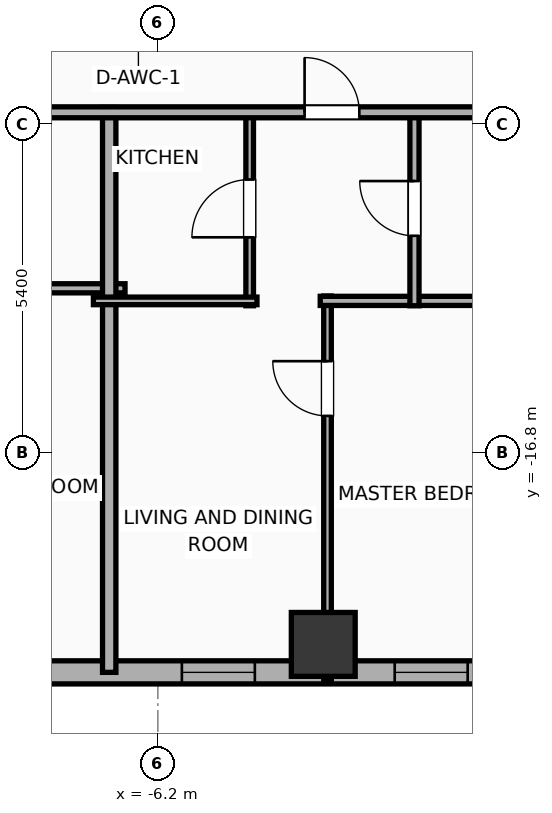
"""IFC4 building model, lengths in metres.
Left out: names, types, materials, properties, quantities, classifications, styles, units other than length and angle.
Written with IfcOpenShell. Run it as: python <this file> out.ifc"""

import sys

from ifc_helpers import new_model, si_unit, direction, frame, frame_2d, origin, origin_2d, place, context, subcontext, project, spatial, rectangle, hollow_rectangle, extrude, element, fill, save


model = new_model("IFC4")
c1 = context("Model", 3, precision=1e-05, world=origin(), true_north=direction((0.0, 1.0)))
c2 = subcontext(c1, "Body", "Model", "MODEL_VIEW")
j1 = project(units=[si_unit("LENGTHUNIT", "METRE"), si_unit("PLANEANGLEUNIT", "RADIAN")], contexts=[c1])
p1 = place(None, origin())
s1 = spatial("IfcSite", under=j1, at=p1, CompositionType="ELEMENT")
p2 = place(p1, origin())
s2 = spatial("IfcBuilding", under=s1, at=p2, CompositionType="ELEMENT")
p3 = place(p2, frame((0.0, 0.0, 120.9)))
s3 = spatial("IfcBuildingStorey", under=s2, at=p3, CompositionType="ELEMENT", Elevation=120.9)
p4 = place(p3, frame((-3.48, -19.95, 0.0), z_axis=(0.0, 0.0, 1.0), x_axis=(1.0, 0.0, 0.0)))
e1 = element("IfcColumn", 1, at=p4, inside=s3, PredefinedType="COLUMN", context=c2, shape_type="SweptSolid", body=[
    extrude(hollow_rectangle(XDim=1.05, YDim=1.05, WallThickness=0.036, at=origin_2d()), origin(), (0.0, 0.0, 1.0), 3.9),
])
p5 = place(p3, frame((29.381, -20.41, 0.0), z_axis=(0.0, 0.0, 1.0), x_axis=(-1.0, 0.0, 0.0)))
e2 = element("IfcWall", 2, at=p5, inside=s3, PredefinedType="ELEMENTEDWALL", context=c2, shape_type="SweptSolid", body=[
    extrude(rectangle(XDim=54.763, YDim=0.38, at=frame_2d((27.381, 0.0))), origin(), (0.0, 0.0, 1.0), 3.65),
])
p6 = place(p5, frame((5.645, 0.0, 0.75)))
e3 = element("IfcOpeningElement", 3, at=p6, cuts=e2, PredefinedType="OPENING", context=c2, shape_type="SweptSolid", body=[
    extrude(rectangle(XDim=2.4, YDim=2.1, at=frame_2d((1.2, 1.05))), frame((0.0, 0.2, 0.0), z_axis=(0.0, -1.0, 0.0), x_axis=(1.0, 0.0, 0.0)), (0.0, 0.0, 1.0), 0.4),
])
p7 = place(p5, frame((47.567, 0.0, 0.75)))
e4 = element("IfcOpeningElement", 4, at=p7, cuts=e2, PredefinedType="OPENING", context=c2, shape_type="SweptSolid", body=[
    extrude(rectangle(XDim=2.4, YDim=2.1, at=frame_2d((1.2, 1.05))), frame((0.0, 0.2, 0.0), z_axis=(0.0, -1.0, 0.0), x_axis=(1.0, 0.0, 0.0)), (0.0, 0.0, 1.0), 0.4),
])
p8 = place(p5, frame((51.831, 0.0, 0.75)))
e5 = element("IfcOpeningElement", 5, at=p8, cuts=e2, PredefinedType="OPENING", context=c2, shape_type="SweptSolid", body=[
    extrude(rectangle(XDim=1.2, YDim=2.05, at=frame_2d((0.6, 1.025))), frame((0.0, 0.2, 0.0), z_axis=(0.0, -1.0, 0.0), x_axis=(1.0, 0.0, 0.0)), (0.0, 0.0, 1.0), 0.4),
])
p9 = place(p5, frame((44.606, 0.0, 0.75)))
e6 = element("IfcOpeningElement", 6, at=p9, cuts=e2, PredefinedType="OPENING", context=c2, shape_type="SweptSolid", body=[
    extrude(rectangle(XDim=1.2, YDim=2.05, at=frame_2d((0.6, 1.025))), frame((0.0, 0.2, 0.0), z_axis=(0.0, -1.0, 0.0), x_axis=(1.0, 0.0, 0.0)), (0.0, 0.0, 1.0), 0.4),
])
p10 = place(p5, frame((40.986, 0.0, 0.75)))
e7 = element("IfcOpeningElement", 7, at=p10, cuts=e2, PredefinedType="OPENING", context=c2, shape_type="SweptSolid", body=[
    extrude(rectangle(XDim=1.2, YDim=2.05, at=frame_2d((0.6, 1.025))), frame((0.0, 0.2, 0.0), z_axis=(0.0, -1.0, 0.0), x_axis=(1.0, 0.0, 0.0)), (0.0, 0.0, 1.0), 0.4),
])
p11 = place(p5, frame((37.486, 0.0, 0.75)))
e8 = element("IfcOpeningElement", 8, at=p11, cuts=e2, PredefinedType="OPENING", context=c2, shape_type="SweptSolid", body=[
    extrude(rectangle(XDim=1.2, YDim=2.05, at=frame_2d((0.6, 1.025))), frame((0.0, 0.2, 0.0), z_axis=(0.0, -1.0, 0.0), x_axis=(1.0, 0.0, 0.0)), (0.0, 0.0, 1.0), 0.4),
])
p12 = place(p5, frame((33.986, 0.0, 0.75)))
e9 = element("IfcOpeningElement", 9, at=p12, cuts=e2, PredefinedType="OPENING", context=c2, shape_type="SweptSolid", body=[
    extrude(rectangle(XDim=1.2, YDim=2.05, at=frame_2d((0.6, 1.025))), frame((0.0, 0.2, 0.0), z_axis=(0.0, -1.0, 0.0), x_axis=(1.0, 0.0, 0.0)), (0.0, 0.0, 1.0), 0.4),
])
p13 = place(p5, frame((30.486, 0.0, 0.75)))
e10 = element("IfcOpeningElement", 10, at=p13, cuts=e2, PredefinedType="OPENING", context=c2, shape_type="SweptSolid", body=[
    extrude(rectangle(XDim=1.2, YDim=2.05, at=frame_2d((0.6, 1.025))), frame((0.0, 0.2, 0.0), z_axis=(0.0, -1.0, 0.0), x_axis=(1.0, 0.0, 0.0)), (0.0, 0.0, 1.0), 0.4),
])
p14 = place(p5, frame((26.986, 0.0, 0.75)))
e11 = element("IfcOpeningElement", 11, at=p14, cuts=e2, PredefinedType="OPENING", context=c2, shape_type="SweptSolid", body=[
    extrude(rectangle(XDim=1.2, YDim=2.05, at=frame_2d((0.6, 1.025))), frame((0.0, 0.2, 0.0), z_axis=(0.0, -1.0, 0.0), x_axis=(1.0, 0.0, 0.0)), (0.0, 0.0, 1.0), 0.4),
])
p15 = place(p5, frame((23.486, 0.0, 0.75)))
e12 = element("IfcOpeningElement", 12, at=p15, cuts=e2, PredefinedType="OPENING", context=c2, shape_type="SweptSolid", body=[
    extrude(rectangle(XDim=1.2, YDim=2.05, at=frame_2d((0.6, 1.025))), frame((0.0, 0.2, 0.0), z_axis=(0.0, -1.0, 0.0), x_axis=(1.0, 0.0, 0.0)), (0.0, 0.0, 1.0), 0.4),
])
p16 = place(p5, frame((19.986, 0.0, 0.75)))
e13 = element("IfcOpeningElement", 13, at=p16, cuts=e2, PredefinedType="OPENING", context=c2, shape_type="SweptSolid", body=[
    extrude(rectangle(XDim=1.2, YDim=2.05, at=frame_2d((0.6, 1.025))), frame((0.0, 0.2, 0.0), z_axis=(0.0, -1.0, 0.0), x_axis=(1.0, 0.0, 0.0)), (0.0, 0.0, 1.0), 0.4),
])
p17 = place(p5, frame((16.486, 0.0, 0.75)))
e14 = element("IfcOpeningElement", 14, at=p17, cuts=e2, PredefinedType="OPENING", context=c2, shape_type="SweptSolid", body=[
    extrude(rectangle(XDim=1.2, YDim=2.05, at=frame_2d((0.6, 1.025))), frame((0.0, 0.2, 0.0), z_axis=(0.0, -1.0, 0.0), x_axis=(1.0, 0.0, 0.0)), (0.0, 0.0, 1.0), 0.4),
])
p18 = place(p5, frame((11.698, 0.0, 0.75)))
e15 = element("IfcOpeningElement", 15, at=p18, cuts=e2, PredefinedType="OPENING", context=c2, shape_type="SweptSolid", body=[
    extrude(rectangle(XDim=1.2, YDim=2.05, at=frame_2d((0.6, 1.025))), frame((0.0, 0.2, 0.0), z_axis=(0.0, -1.0, 0.0), x_axis=(1.0, 0.0, 0.0)), (0.0, 0.0, 1.0), 0.4),
])
p19 = place(p5, frame((3.172, 0.0, 0.75)))
e16 = element("IfcOpeningElement", 16, at=p19, cuts=e2, PredefinedType="OPENING", context=c2, shape_type="SweptSolid", body=[
    extrude(rectangle(XDim=1.2, YDim=2.05, at=frame_2d((0.6, 1.025))), frame((0.0, 0.2, 0.0), z_axis=(0.0, -1.0, 0.0), x_axis=(1.0, 0.0, 0.0)), (0.0, 0.0, 1.0), 0.4),
])
p20 = place(p5, frame((1.13, 0.0, 0.75)))
e17 = element("IfcOpeningElement", 17, at=p20, cuts=e2, PredefinedType="OPENING", context=c2, shape_type="SweptSolid", body=[
    extrude(rectangle(XDim=1.2, YDim=2.05, at=frame_2d((0.6, 1.025))), frame((0.0, 0.2, 0.0), z_axis=(0.0, -1.0, 0.0), x_axis=(1.0, 0.0, 0.0)), (0.0, 0.0, 1.0), 0.4),
])
p21 = place(p3, frame((-10.53, -14.094, 0.0), z_axis=(0.0, 0.0, 1.0), x_axis=(1.0, 0.0, 0.0)))
e18 = element("IfcWall", 18, at=p21, inside=s3, PredefinedType="PLUMBINGWALL", context=c2, shape_type="SweptSolid", body=[
    extrude(rectangle(XDim=3.79, YDim=0.15, at=frame_2d((1.895, 0.0))), origin(), (0.0, 0.0, 1.0), 3.65),
])
p22 = place(p3, frame((-7.0, -20.41, 0.0), z_axis=(0.0, 0.0, 1.0), x_axis=(0.0, 1.0, 0.0)))
e19 = element("IfcWall", 19, at=p22, inside=s3, PredefinedType="PARTITIONING", context=c2, shape_type="SweptSolid", body=[
    extrude(rectangle(XDim=9.29, YDim=0.22, at=frame_2d((4.645, 0.0))), origin(), (0.0, 0.0, 1.0), 3.65),
])
p23 = place(p3, frame((-3.41, -20.56, 0.0), z_axis=(0.0, 0.0, 1.0), x_axis=(0.0, 1.0, 0.0)))
e20 = element("IfcWall", 20, at=p23, inside=s3, PredefinedType="PARTITIONING", context=c2, shape_type="SweptSolid", body=[
    extrude(rectangle(XDim=6.339, YDim=0.125, at=frame_2d((3.169, 0.0))), origin(), (0.0, 0.0, 1.0), 3.04),
])
p24 = place(p23, frame((4.368, 0.0, 0.0)))
e21 = element("IfcOpeningElement", 21, at=p24, cuts=e20, PredefinedType="OPENING", context=c2, shape_type="SweptSolid", body=[
    extrude(rectangle(XDim=0.9, YDim=2.05, at=frame_2d((0.45, 1.025))), frame((0.0, 0.073, 0.0), z_axis=(0.0, -1.0, 0.0), x_axis=(1.0, 0.0, 0.0)), (0.0, 0.0, 1.0), 0.145),
])
p25 = place(p3, frame((-3.53, -14.301, 0.0), z_axis=(0.0, 0.0, 1.0), x_axis=(1.0, 0.0, 0.0)))
e22 = element("IfcWall", 22, at=p25, inside=s3, PredefinedType="PLUMBINGWALL", context=c2, shape_type="SweptSolid", body=[
    extrude(rectangle(XDim=3.79, YDim=0.15, at=frame_2d((1.895, 0.0))), origin(), (0.0, 0.0, 1.0), 3.65),
])
p26 = place(p3, frame((-4.69, -14.381, 0.0), z_axis=(0.0, 0.0, 1.0), x_axis=(0.0, 1.0, 0.0)))
e23 = element("IfcWall", 23, at=p26, inside=s3, PredefinedType="PARTITIONING", context=c2, shape_type="SweptSolid", body=[
    extrude(rectangle(XDim=3.201, YDim=0.125, at=frame_2d((1.601, 0.0))), origin(), (0.0, 0.0, 1.0), 3.65),
])
p27 = place(p26, frame((1.125, 0.0, 0.0)))
e24 = element("IfcOpeningElement", 24, at=p27, cuts=e23, PredefinedType="OPENING", context=c2, shape_type="SweptSolid", body=[
    extrude(rectangle(XDim=0.95, YDim=2.05, at=frame_2d((0.475, 1.025))), frame((0.0, 0.073, 0.0), z_axis=(0.0, -1.0, 0.0), x_axis=(1.0, 0.0, 0.0)), (0.0, 0.0, 1.0), 0.145),
])
p28 = place(p3, frame((-7.26, -14.301, 0.0), z_axis=(0.0, 0.0, 1.0), x_axis=(1.0, 0.0, 0.0)))
e25 = element("IfcWall", 25, at=p28, inside=s3, PredefinedType="PARTITIONING", context=c2, shape_type="SweptSolid", body=[
    extrude(rectangle(XDim=2.69, YDim=0.125, at=frame_2d((1.345, 0.0))), origin(), (0.0, 0.0, 1.0), 3.65),
])
p29 = place(p3, frame((-1.98, -14.381, 0.0), z_axis=(0.0, 0.0, 1.0), x_axis=(0.0, 1.0, 0.0)))
e26 = element("IfcWall", 26, at=p29, inside=s3, PredefinedType="PLUMBINGWALL", context=c2, shape_type="SweptSolid", body=[
    extrude(rectangle(XDim=3.201, YDim=0.15, at=frame_2d((1.601, 0.0))), origin(), (0.0, 0.0, 1.0), 3.65),
])
p30 = place(p29, frame((1.15, 0.0, 0.0)))
e27 = element("IfcOpeningElement", 27, at=p30, cuts=e26, PredefinedType="OPENING", context=c2, shape_type="SweptSolid", body=[
    extrude(rectangle(XDim=0.9, YDim=2.05, at=frame_2d((0.45, 1.025))), frame((0.0, 0.085, 0.0), z_axis=(0.0, -1.0, 0.0), x_axis=(1.0, 0.0, 0.0)), (0.0, 0.0, 1.0), 0.17),
])
p31 = place(p3, frame((-29.21, -11.2, 0.0), z_axis=(0.0, 0.0, 1.0), x_axis=(1.0, 0.0, 0.0)))
e28 = element("IfcWall", 28, at=p31, inside=s3, PredefinedType="PARTITIONING", context=c2, shape_type="SweptSolid", body=[
    extrude(rectangle(XDim=62.42, YDim=0.18, at=frame_2d((31.21, 0.0))), origin(), (0.0, 0.0, 1.0), 3.65),
])
p32 = place(p31, frame((3.357, 0.0, 0.0)))
e29 = element("IfcOpeningElement", 29, at=p32, cuts=e28, PredefinedType="OPENING", context=c2, shape_type="SweptSolid", body=[
    extrude(rectangle(XDim=1.15, YDim=2.05, at=frame_2d((0.575, 1.025))), frame((0.0, 0.1, 0.0), z_axis=(0.0, -1.0, 0.0), x_axis=(1.0, 0.0, 0.0)), (0.0, 0.0, 1.0), 0.2),
])
p33 = place(p31, frame((10.998, 0.0, 0.0)))
e30 = element("IfcOpeningElement", 30, at=p33, cuts=e28, PredefinedType="OPENING", context=c2, shape_type="SweptSolid", body=[
    extrude(rectangle(XDim=1.15, YDim=2.05, at=frame_2d((0.575, 1.025))), frame((0.0, 0.1, 0.0), z_axis=(0.0, -1.0, 0.0), x_axis=(1.0, 0.0, 0.0)), (0.0, 0.0, 1.0), 0.2),
])
p34 = place(p31, frame((18.426, 0.0, 0.0)))
e31 = element("IfcOpeningElement", 31, at=p34, cuts=e28, PredefinedType="OPENING", context=c2, shape_type="SweptSolid", body=[
    extrude(rectangle(XDim=0.9, YDim=2.05, at=frame_2d((0.45, 1.025))), frame((0.0, 0.1, 0.0), z_axis=(0.0, -1.0, 0.0), x_axis=(1.0, 0.0, 0.0)), (0.0, 0.0, 1.0), 0.2),
])
p35 = place(p31, frame((25.423, 0.0, 0.0)))
e32 = element("IfcOpeningElement", 32, at=p35, cuts=e28, PredefinedType="OPENING", context=c2, shape_type="SweptSolid", body=[
    extrude(rectangle(XDim=0.9, YDim=2.05, at=frame_2d((0.45, 1.025))), frame((0.0, 0.1, 0.0), z_axis=(0.0, -1.0, 0.0), x_axis=(1.0, 0.0, 0.0)), (0.0, 0.0, 1.0), 0.2),
])
p36 = place(p31, frame((32.427, 0.0, 0.0)))
e33 = element("IfcOpeningElement", 33, at=p36, cuts=e28, PredefinedType="OPENING", context=c2, shape_type="SweptSolid", body=[
    extrude(rectangle(XDim=0.9, YDim=2.05, at=frame_2d((0.45, 1.025))), frame((0.0, 0.1, 0.0), z_axis=(0.0, -1.0, 0.0), x_axis=(1.0, 0.0, 0.0)), (0.0, 0.0, 1.0), 0.2),
])
p37 = place(p31, frame((39.424, 0.0, 0.0)))
e34 = element("IfcOpeningElement", 34, at=p37, cuts=e28, PredefinedType="OPENING", context=c2, shape_type="SweptSolid", body=[
    extrude(rectangle(XDim=0.9, YDim=2.05, at=frame_2d((0.45, 1.025))), frame((0.0, 0.1, 0.0), z_axis=(0.0, -1.0, 0.0), x_axis=(1.0, 0.0, 0.0)), (0.0, 0.0, 1.0), 0.2),
])
p38 = place(p31, frame((46.09, 0.0, 0.0)))
e35 = element("IfcOpeningElement", 35, at=p38, cuts=e28, PredefinedType="OPENING", context=c2, shape_type="SweptSolid", body=[
    extrude(rectangle(XDim=0.9, YDim=2.05, at=frame_2d((0.45, 1.025))), frame((0.0, 0.1, 0.0), z_axis=(0.0, -1.0, 0.0), x_axis=(1.0, 0.0, 0.0)), (0.0, 0.0, 1.0), 0.2),
])
p39 = place(p31, frame((51.071, 0.0, 0.0)))
e36 = element("IfcOpeningElement", 36, at=p39, cuts=e28, PredefinedType="OPENING", context=c2, shape_type="SweptSolid", body=[
    extrude(rectangle(XDim=1.15, YDim=2.05, at=frame_2d((0.575, 1.025))), frame((0.0, 0.1, 0.0), z_axis=(0.0, -1.0, 0.0), x_axis=(1.0, 0.0, 0.0)), (0.0, 0.0, 1.0), 0.2),
])
p40 = place(p31, frame((58.93, 0.0, 0.0)))
e37 = element("IfcOpeningElement", 37, at=p40, cuts=e28, PredefinedType="OPENING", context=c2, shape_type="SweptSolid", body=[
    extrude(rectangle(XDim=0.9, YDim=2.05, at=frame_2d((0.45, 1.025))), frame((0.0, 0.1, 0.0), z_axis=(0.0, -1.0, 0.0), x_axis=(1.0, 0.0, 0.0)), (0.0, 0.0, 1.0), 0.2),
])
p41 = place(p12, origin())
e38 = element("IfcWindow", 38, at=p41, inside=s3, PartitioningType="SINGLE_PANEL", PredefinedType="WINDOW", context=c2, shape_type="SweptSolid", body=[
    extrude(rectangle(XDim=1.2, YDim=2.05, at=frame_2d((0.6, 1.025))), frame((0.0, 0.03, 0.0), z_axis=(0.0, -1.0, 0.0), x_axis=(1.0, 0.0, 0.0)), (0.0, 0.0, 1.0), 0.06),
])
fill(e9, e38)
p42 = place(p13, origin())
e39 = element("IfcWindow", 39, at=p42, inside=s3, PartitioningType="SINGLE_PANEL", PredefinedType="WINDOW", context=c2, shape_type="SweptSolid", body=[
    extrude(rectangle(XDim=1.2, YDim=2.05, at=frame_2d((0.6, 1.025))), frame((0.0, 0.03, 0.0), z_axis=(0.0, -1.0, 0.0), x_axis=(1.0, 0.0, 0.0)), (0.0, 0.0, 1.0), 0.06),
])
fill(e10, e39)
p43 = place(p24, origin())
e40 = element("IfcDoor", 40, at=p43, inside=s3, OperationType="SINGLE_SWING_RIGHT", PredefinedType="DOOR", context=c2, shape_type="SweptSolid", body=[
    extrude(rectangle(XDim=0.9, YDim=2.05, at=frame_2d((0.45, 1.025))), frame((0.0, 0.025, 0.0), z_axis=(0.0, -1.0, 0.0), x_axis=(1.0, 0.0, 0.0)), (0.0, 0.0, 1.0), 0.05),
])
fill(e21, e40)
p44 = place(p27, origin())
e41 = element("IfcDoor", 41, at=p44, inside=s3, OperationType="SINGLE_SWING_LEFT", PredefinedType="DOOR", context=c2, shape_type="SweptSolid", body=[
    extrude(rectangle(XDim=0.95, YDim=2.05, at=frame_2d((0.475, 1.025))), frame((0.0, 0.025, 0.0), z_axis=(0.0, -1.0, 0.0), x_axis=(1.0, 0.0, 0.0)), (0.0, 0.0, 1.0), 0.05),
])
fill(e24, e41)
p45 = place(p30, origin())
e42 = element("IfcDoor", 42, at=p45, inside=s3, OperationType="SINGLE_SWING_RIGHT", PredefinedType="DOOR", context=c2, shape_type="SweptSolid", body=[
    extrude(rectangle(XDim=0.9, YDim=2.05, at=frame_2d((0.45, 1.025))), frame((0.0, 0.025, 0.0), z_axis=(0.0, -1.0, 0.0), x_axis=(1.0, 0.0, 0.0)), (0.0, 0.0, 1.0), 0.05),
])
fill(e27, e42)
p46 = place(p35, origin())
e43 = element("IfcDoor", 43, at=p46, inside=s3, OperationType="SINGLE_SWING_LEFT", PredefinedType="DOOR", context=c2, shape_type="SweptSolid", body=[
    extrude(rectangle(XDim=0.9, YDim=2.05, at=frame_2d((0.45, 1.025))), frame((0.0, 0.025, 0.0), z_axis=(0.0, -1.0, 0.0), x_axis=(1.0, 0.0, 0.0)), (0.0, 0.0, 1.0), 0.05),
])
fill(e32, e43)
save(model, sys.argv[1])
